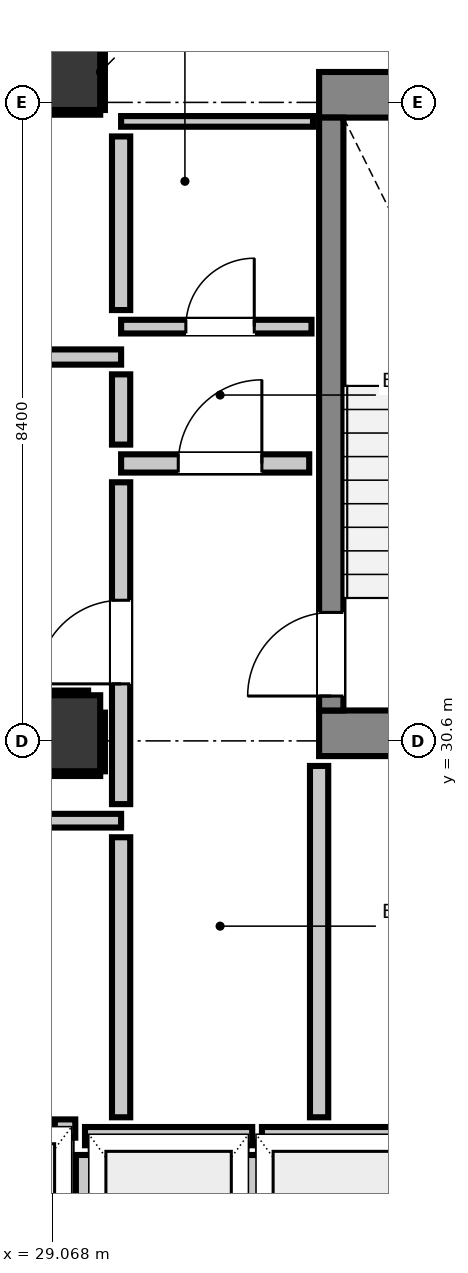
"""IFC4 building model, lengths in metres.
Left out: names, types, materials, properties, quantities, classifications, styles, units other than length and angle.
Written with IfcOpenShell. Run it as: python <this file> out.ifc"""

import sys

from ifc_helpers import new_model, si_unit, direction, frame, frame_2d, origin, origin_2d, place, context, subcontext, project, spatial, rectangle, extrude, element, fill, save


model = new_model("IFC4")
c1 = context("Model", 3, precision=1e-05, world=origin(), true_north=direction((0.0, 1.0)))
c2 = subcontext(c1, "Body", "Model", "MODEL_VIEW")
j1 = project(units=[si_unit("LENGTHUNIT", "METRE"), si_unit("PLANEANGLEUNIT", "RADIAN")], contexts=[c1])
p1 = place(None, origin())
s1 = spatial("IfcSite", under=j1, at=p1, CompositionType="ELEMENT")
p2 = place(p1, origin())
s2 = spatial("IfcBuilding", under=s1, at=p2, CompositionType="ELEMENT")
p3 = place(p2, frame((0.0, 0.0, 28.64)))
s3 = spatial("IfcBuildingStorey", under=s2, at=p3, CompositionType="ELEMENT", Elevation=28.64)
p4 = place(p3, frame((29.2, 39.4, 0.0), z_axis=(0.0, 0.0, 1.0), x_axis=(1.0, 0.0, 0.0)))
e1 = element("IfcColumn", 1, at=p4, inside=s3, PredefinedType="COLUMN", context=c2, shape_type="SweptSolid", body=[
    extrude(rectangle(XDim=1.0, YDim=1.0, at=origin_2d()), origin(), (0.0, 0.0, 1.0), 3.32),
])
p5 = place(p3, frame((32.58, 39.1, 0.0), z_axis=(0.0, 0.0, 1.0), x_axis=(1.0, 0.0, 0.0)))
e2 = element("IfcWall", 2, at=p5, inside=s3, PredefinedType="SHEAR", context=c2, shape_type="SweptSolid", body=[
    extrude(rectangle(XDim=4.08, YDim=0.6, at=frame_2d((2.04, 0.0))), origin(), (0.0, 0.0, 1.0), 3.32),
])
p6 = place(p3, frame((32.58, 30.7, 0.0), z_axis=(0.0, 0.0, 1.0), x_axis=(1.0, 0.0, 0.0)))
e3 = element("IfcWall", 3, at=p6, inside=s3, PredefinedType="SHEAR", context=c2, shape_type="SweptSolid", body=[
    extrude(rectangle(XDim=3.415, YDim=0.6, at=frame_2d((1.708, 0.0))), origin(), (0.0, 0.0, 1.0), 3.32),
])
p7 = place(p3, frame((32.74, 31.0, 0.0), z_axis=(0.0, 0.0, 1.0), x_axis=(0.0, 1.0, 0.0)))
e4 = element("IfcWall", 4, at=p7, inside=s3, PredefinedType="SHEAR", context=c2, shape_type="SweptSolid", body=[
    extrude(rectangle(XDim=7.8, YDim=0.32, at=frame_2d((3.9, 0.0))), origin(), (0.0, 0.0, 1.0), 3.32),
])
p8 = place(p7, frame((0.19, 0.0, 0.0)))
e5 = element("IfcOpeningElement", 5, at=p8, cuts=e4, PredefinedType="OPENING", context=c2, shape_type="SweptSolid", body=[
    extrude(rectangle(XDim=1.1, YDim=2.15, at=frame_2d((0.55, 1.075))), frame((0.0, 0.17, 0.0), z_axis=(0.0, -1.0, 0.0), x_axis=(1.0, 0.0, 0.0)), (0.0, 0.0, 1.0), 0.34),
])
p9 = place(p3, frame((29.2, 30.7, 0.0), z_axis=(0.0, 0.0, 1.0), x_axis=(1.0, 0.0, 0.0)))
e6 = element("IfcColumn", 6, at=p9, inside=s3, PredefinedType="COLUMN", context=c2, shape_type="SweptSolid", body=[
    extrude(rectangle(XDim=1.0, YDim=1.0, at=origin_2d()), origin(), (0.0, 0.0, 1.0), 3.32),
])
p10 = place(p3, frame((29.5, 25.4, 0.0), z_axis=(0.0, 0.0, 1.0), x_axis=(1.0, 0.0, 0.0)))
e7 = element("IfcWall", 7, at=p10, inside=s3, PredefinedType="PARTITIONING", context=c2, shape_type="SweptSolid", body=[
    extrude(rectangle(XDim=2.2, YDim=0.24, at=frame_2d((1.1, 0.0))), origin(), (0.0, 0.0, 1.0), 3.06),
])
p11 = place(p3, frame((29.5, 22.632, 0.0), z_axis=(0.0, 0.0, 1.0), x_axis=(0.0, 1.0, 0.0)))
e8 = element("IfcWall", 8, at=p11, inside=s3, PredefinedType="PARTITIONING", context=c2, shape_type="SweptSolid", body=[
    extrude(rectangle(XDim=2.52, YDim=0.24, at=frame_2d((1.26, 0.0))), origin(), (0.0, 0.0, 1.0), 2.295),
])
p12 = place(p3, frame((31.7, 22.73, 0.0), z_axis=(0.0, 0.0, 1.0), x_axis=(0.0, 1.0, 0.0)))
e9 = element("IfcWall", 9, at=p12, inside=s3, PredefinedType="PARTITIONING", context=c2, shape_type="SweptSolid", body=[
    extrude(rectangle(XDim=2.422, YDim=0.24, at=frame_2d((1.211, 0.0))), origin(), (0.0, 0.0, 1.0), 3.06),
])
p13 = place(p3, frame((31.828, 25.4, 0.0), z_axis=(0.0, 0.0, 1.0), x_axis=(1.0, 0.0, 0.0)))
e10 = element("IfcWall", 10, at=p13, inside=s3, PredefinedType="PARTITIONING", context=c2, shape_type="SweptSolid", body=[
    extrude(rectangle(XDim=2.072, YDim=0.24, at=frame_2d((1.036, 0.0))), origin(), (0.0, 0.0, 1.0), 3.06),
])
p14 = place(p3, frame((29.103, 25.5, 0.0), z_axis=(0.0, 0.0, 1.0), x_axis=(1.0, 0.0, 0.0)))
e11 = element("IfcWall", 11, at=p14, inside=s3, PredefinedType="PARTITIONING", context=c2, shape_type="SweptSolid", body=[
    extrude(rectangle(XDim=0.269, YDim=0.24, at=frame_2d((0.135, 0.0))), origin(), (0.0, 0.0, 1.0), 3.06),
])
p15 = place(p3, frame((29.975, 34.25, 0.0), z_axis=(0.0, 0.0, 1.0), x_axis=(1.0, 0.0, 0.0)))
e12 = element("IfcWall", 12, at=p15, inside=s3, PredefinedType="PARTITIONING", context=c2, shape_type="SweptSolid", body=[
    extrude(rectangle(XDim=2.475, YDim=0.24, at=frame_2d((1.237, 0.0))), origin(), (0.0, 0.0, 1.0), 3.06),
])
p16 = place(p15, frame((0.752, 0.0, 0.0)))
e13 = element("IfcOpeningElement", 13, at=p16, cuts=e12, PredefinedType="OPENING", context=c2, shape_type="SweptSolid", body=[
    extrude(rectangle(XDim=1.1, YDim=2.15, at=frame_2d((0.55, 1.075))), frame((0.0, 0.13, 0.0), z_axis=(0.0, -1.0, 0.0), x_axis=(1.0, 0.0, 0.0)), (0.0, 0.0, 1.0), 0.26),
])
p17 = place(p3, frame((28.604, 35.65, 0.0), z_axis=(0.0, 0.0, 1.0), x_axis=(1.0, 0.0, 0.0)))
e14 = element("IfcWall", 14, at=p17, inside=s3, PredefinedType="PARTITIONING", context=c2, shape_type="SweptSolid", body=[
    extrude(rectangle(XDim=1.371, YDim=0.2, at=frame_2d((0.686, 0.0))), origin(), (0.0, 0.0, 1.0), 3.06),
])
p18 = place(p3, frame((20.65, 29.55, 0.0), z_axis=(0.0, 0.0, 1.0), x_axis=(1.0, 0.0, 0.0)))
e15 = element("IfcWall", 15, at=p18, inside=s3, PredefinedType="PARTITIONING", context=c2, shape_type="SweptSolid", body=[
    extrude(rectangle(XDim=9.325, YDim=0.18, at=frame_2d((4.663, 0.0))), origin(), (0.0, 0.0, 1.0), 3.06),
])
p19 = place(p3, frame((29.975, 36.05, 0.0), z_axis=(0.0, 0.0, 1.0), x_axis=(1.0, 0.0, 0.0)))
e16 = element("IfcWall", 16, at=p19, inside=s3, PredefinedType="PARTITIONING", context=c2, shape_type="SweptSolid", body=[
    extrude(rectangle(XDim=2.505, YDim=0.18, at=frame_2d((1.252, 0.0))), origin(), (0.0, 0.0, 1.0), 3.06),
])
p20 = place(p19, frame((0.852, 0.0, 0.0)))
e17 = element("IfcOpeningElement", 17, at=p20, cuts=e16, PredefinedType="OPENING", context=c2, shape_type="SweptSolid", body=[
    extrude(rectangle(XDim=0.9, YDim=2.1, at=frame_2d((0.45, 1.05))), frame((0.0, 0.1, 0.0), z_axis=(0.0, -1.0, 0.0), x_axis=(1.0, 0.0, 0.0)), (0.0, 0.0, 1.0), 0.2),
])
p21 = place(p3, frame((29.975, 38.75, 0.0), z_axis=(0.0, 0.0, 1.0), x_axis=(1.0, 0.0, 0.0)))
e18 = element("IfcWall", 18, at=p21, inside=s3, PredefinedType="PARTITIONING", context=c2, shape_type="SweptSolid", body=[
    extrude(rectangle(XDim=2.525, YDim=0.14, at=frame_2d((1.262, 0.0))), origin(), (0.0, 0.0, 1.0), 3.06),
])
p22 = place(p3, frame((29.975, 25.648, 0.0), z_axis=(0.0, 0.0, 1.0), x_axis=(0.0, 1.0, 0.0)))
e19 = element("IfcWall", 19, at=p22, inside=s3, PredefinedType="PARTITIONING", context=c2, shape_type="SweptSolid", body=[
    extrude(rectangle(XDim=3.684, YDim=0.24, at=frame_2d((1.842, 0.0))), origin(), (0.0, 0.0, 1.0), 3.06),
])
p23 = place(p3, frame((29.975, 29.768, 0.0), z_axis=(0.0, 0.0, 1.0), x_axis=(0.0, 1.0, 0.0)))
e20 = element("IfcWall", 20, at=p23, inside=s3, PredefinedType="PARTITIONING", context=c2, shape_type="SweptSolid", body=[
    extrude(rectangle(XDim=4.234, YDim=0.24, at=frame_2d((2.117, 0.0))), origin(), (0.0, 0.0, 1.0), 3.06),
])
p24 = place(p23, frame((1.582, 0.0, 0.0)))
e21 = element("IfcOpeningElement", 21, at=p24, cuts=e20, PredefinedType="OPENING", context=c2, shape_type="SweptSolid", body=[
    extrude(rectangle(XDim=1.1, YDim=2.15, at=frame_2d((0.55, 1.075))), frame((0.0, 0.13, 0.0), z_axis=(0.0, -1.0, 0.0), x_axis=(1.0, 0.0, 0.0)), (0.0, 0.0, 1.0), 0.26),
])
p25 = place(p3, frame((29.975, 34.498, 0.0), z_axis=(0.0, 0.0, 1.0), x_axis=(0.0, 1.0, 0.0)))
e22 = element("IfcWall", 22, at=p25, inside=s3, PredefinedType="PARTITIONING", context=c2, shape_type="SweptSolid", body=[
    extrude(rectangle(XDim=0.924, YDim=0.24, at=frame_2d((0.462, 0.0))), origin(), (0.0, 0.0, 1.0), 3.06),
])
p26 = place(p3, frame((29.975, 36.268, 0.0), z_axis=(0.0, 0.0, 1.0), x_axis=(0.0, 1.0, 0.0)))
e23 = element("IfcWall", 23, at=p26, inside=s3, PredefinedType="PARTITIONING", context=c2, shape_type="SweptSolid", body=[
    extrude(rectangle(XDim=2.284, YDim=0.24, at=frame_2d((1.142, 0.0))), origin(), (0.0, 0.0, 1.0), 3.06),
])
p27 = place(p3, frame((32.58, 25.648, 0.0), z_axis=(0.0, 0.0, 1.0), x_axis=(0.0, 1.0, 0.0)))
e24 = element("IfcWall", 24, at=p27, inside=s3, PredefinedType="PARTITIONING", context=c2, shape_type="SweptSolid", body=[
    extrude(rectangle(XDim=4.622, YDim=0.24, at=frame_2d((2.311, 0.0))), origin(), (0.0, 0.0, 1.0), 3.06),
])
p28 = place(p3, frame((28.71, 38.868, 0.0), z_axis=(0.0, 0.0, 1.0), x_axis=(1.0, 0.0, 0.0)))
e25 = element("IfcWall", 25, at=p28, inside=s3, PredefinedType="PARTITIONING", context=c2, shape_type="SweptSolid", body=[
    extrude(rectangle(XDim=0.99, YDim=0.06, at=frame_2d((0.495, 0.0))), origin(), (0.0, 0.0, 1.0), 1.45),
])
for number, where, z_axis, x_axis in (
    (26, (29.732, 38.9, 0.0), (0.0, 0.0, 1.0), (0.0, 1.0, 0.0)),
    (27, (28.7, 30.168, 0.0), (0.0, 0.0, 1.0), (1.0, 0.0, 0.0)),
):
    element("IfcWall", number, at=place(p3, frame(where, z_axis=z_axis, x_axis=x_axis)), inside=s3, PredefinedType="PARTITIONING", context=c2, shape_type="SweptSolid", body=[
        extrude(rectangle(XDim=1.0, YDim=0.06, at=frame_2d((0.5, 0.0))), origin(), (0.0, 0.0, 1.0), 1.45),
    ])
p29 = place(p3, frame((28.7, 31.232, 0.0), z_axis=(0.0, 0.0, 1.0), x_axis=(1.0, 0.0, 0.0)))
e28 = element("IfcWall", 28, at=p29, inside=s3, PredefinedType="PARTITIONING", context=c2, shape_type="SweptSolid", body=[
    extrude(rectangle(XDim=0.841, YDim=0.06, at=frame_2d((0.42, 0.0))), origin(), (0.0, 0.0, 1.0), 1.45),
])
p30 = place(p3, frame((29.732, 30.2, 0.0), z_axis=(0.0, 0.0, 1.0), x_axis=(0.0, 1.0, 0.0)))
e29 = element("IfcWall", 29, at=p30, inside=s3, PredefinedType="PARTITIONING", context=c2, shape_type="SweptSolid", body=[
    extrude(rectangle(XDim=0.772, YDim=0.06, at=frame_2d((0.386, 0.0))), origin(), (0.0, 0.0, 1.0), 1.45),
])
p31 = place(p8, origin())
e30 = element("IfcDoor", 30, at=p31, inside=s3, OperationType="SINGLE_SWING_LEFT", PredefinedType="DOOR", context=c2, shape_type="SweptSolid", body=[
    extrude(rectangle(XDim=1.1, YDim=2.15, at=frame_2d((0.55, 1.075))), frame((0.0, 0.025, 0.0), z_axis=(0.0, -1.0, 0.0), x_axis=(1.0, 0.0, 0.0)), (0.0, 0.0, 1.0), 0.05),
])
fill(e5, e30)
p32 = place(p24, origin())
e31 = element("IfcDoor", 31, at=p32, inside=s3, OperationType="SINGLE_SWING_LEFT", PredefinedType="DOOR", context=c2, shape_type="SweptSolid", body=[
    extrude(rectangle(XDim=1.1, YDim=2.15, at=frame_2d((0.55, 1.075))), frame((0.0, 0.025, 0.0), z_axis=(0.0, -1.0, 0.0), x_axis=(1.0, 0.0, 0.0)), (0.0, 0.0, 1.0), 0.05),
])
fill(e21, e31)
p33 = place(p16, origin())
e32 = element("IfcDoor", 32, at=p33, inside=s3, OperationType="SINGLE_SWING_RIGHT", PredefinedType="DOOR", context=c2, shape_type="SweptSolid", body=[
    extrude(rectangle(XDim=1.1, YDim=2.15, at=frame_2d((0.55, 1.075))), frame((0.0, 0.025, 0.0), z_axis=(0.0, -1.0, 0.0), x_axis=(1.0, 0.0, 0.0)), (0.0, 0.0, 1.0), 0.05),
])
fill(e13, e32)
p34 = place(p20, origin())
e33 = element("IfcDoor", 33, at=p34, inside=s3, OperationType="SINGLE_SWING_RIGHT", PredefinedType="DOOR", context=c2, shape_type="SweptSolid", body=[
    extrude(rectangle(XDim=0.9, YDim=2.1, at=frame_2d((0.45, 1.05))), frame((0.0, 0.025, 0.0), z_axis=(0.0, -1.0, 0.0), x_axis=(1.0, 0.0, 0.0)), (0.0, 0.0, 1.0), 0.05),
])
fill(e17, e33)
save(model, sys.argv[1])
